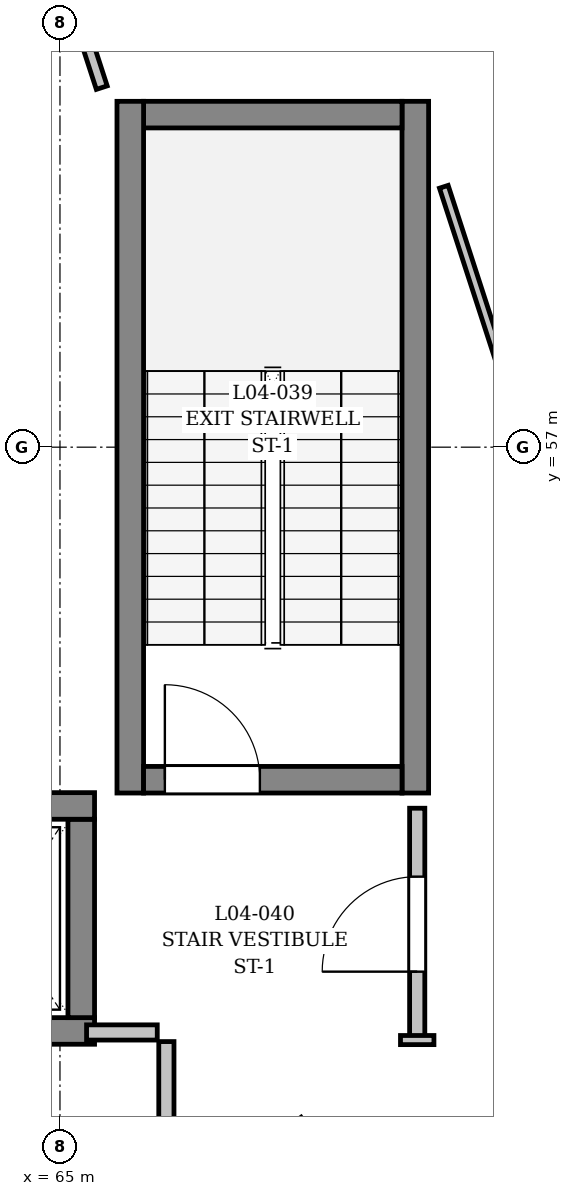
"""IFC4 building model, lengths in metres.
Left out: names, types, materials, properties, quantities, classifications, styles, units other than length and angle.
Written with IfcOpenShell. Run it as: python <this file> out.ifc"""

import sys

from ifc_helpers import new_model, si_unit, direction, frame, frame_2d, origin, place, context, subcontext, project, spatial, rectangle, extrude, element, fill, save


model = new_model("IFC4")
c1 = context("Model", 3, precision=1e-05, world=origin(), true_north=direction((0.0, 1.0)))
c2 = subcontext(c1, "Body", "Model", "MODEL_VIEW")
j1 = project(units=[si_unit("LENGTHUNIT", "METRE"), si_unit("PLANEANGLEUNIT", "RADIAN")], contexts=[c1])
p1 = place(None, origin())
s1 = spatial("IfcSite", under=j1, at=p1, CompositionType="ELEMENT")
p2 = place(p1, origin())
s2 = spatial("IfcBuilding", under=s1, at=p2, CompositionType="ELEMENT")
p3 = place(p2, frame((0.0, 0.0, 15.0)))
s3 = spatial("IfcBuildingStorey", under=s2, at=p3, CompositionType="ELEMENT", Elevation=15.0)
p4 = place(p3, frame((69.675, 52.45, 0.0), z_axis=(0.0, 0.0, 1.0), x_axis=(0.0, 1.0, 0.0)))
e1 = element("IfcWall", 1, at=p4, inside=s3, PredefinedType="SHEAR", context=c2, shape_type="SweptSolid", body=[
    extrude(rectangle(XDim=9.1, YDim=0.35, at=frame_2d((4.55, 0.0))), origin(), (0.0, 0.0, 1.0), 4.45),
])
p5 = place(p3, frame((69.5, 61.375, 0.0), z_axis=(0.0, 0.0, 1.0), x_axis=(-1.0, 0.0, 0.0)))
e2 = element("IfcWall", 2, at=p5, inside=s3, PredefinedType="SHEAR", context=c2, shape_type="SweptSolid", body=[
    extrude(rectangle(XDim=3.4, YDim=0.35, at=frame_2d((1.7, 0.0))), origin(), (0.0, 0.0, 1.0), 4.45),
])
p6 = place(p3, frame((65.925, 61.55, 0.0), z_axis=(0.0, 0.0, 1.0), x_axis=(0.0, -1.0, 0.0)))
e3 = element("IfcWall", 3, at=p6, inside=s3, PredefinedType="SHEAR", context=c2, shape_type="SweptSolid", body=[
    extrude(rectangle(XDim=9.1, YDim=0.35, at=frame_2d((4.55, 0.0))), origin(), (0.0, 0.0, 1.0), 4.45),
])
p7 = place(p3, frame((66.1, 52.625, 0.0), z_axis=(0.0, 0.0, 1.0), x_axis=(1.0, 0.0, 0.0)))
e4 = element("IfcWall", 4, at=p7, inside=s3, PredefinedType="SHEAR", context=c2, shape_type="SweptSolid", body=[
    extrude(rectangle(XDim=3.4, YDim=0.35, at=frame_2d((1.7, 0.0))), origin(), (0.0, 0.0, 1.0), 4.45),
])
p8 = place(p7, frame((0.28, 0.0, 0.0)))
e5 = element("IfcOpeningElement", 5, at=p8, cuts=e4, PredefinedType="OPENING", context=c2, shape_type="SweptSolid", body=[
    extrude(rectangle(XDim=1.25, YDim=2.2, at=frame_2d((0.625, 1.1))), frame((0.0, 0.185, 0.0), z_axis=(0.0, -1.0, 0.0), x_axis=(1.0, 0.0, 0.0)), (0.0, 0.0, 1.0), 0.37),
])
p9 = place(p3, frame((62.945, 49.32, 0.0), z_axis=(0.0, 0.0, 1.0), x_axis=(1.0, 0.0, 0.0)))
e6 = element("IfcWall", 6, at=p9, inside=s3, PredefinedType="SHEAR", context=c2, shape_type="SweptSolid", body=[
    extrude(rectangle(XDim=2.51, YDim=0.35, at=frame_2d((1.255, 0.0))), origin(), (0.0, 0.0, 1.0), 4.45),
])
p10 = place(p9, frame((0.705, 0.0, 0.0)))
e7 = element("IfcOpeningElement", 7, at=p10, cuts=e6, PredefinedType="OPENING", context=c2, shape_type="SweptSolid", body=[
    extrude(rectangle(XDim=1.1, YDim=2.2, at=frame_2d((0.55, 1.1))), frame((0.0, 0.185, 0.0), z_axis=(0.0, -1.0, 0.0), x_axis=(1.0, 0.0, 0.0)), (0.0, 0.0, 1.0), 0.37),
])
p11 = place(p3, frame((65.28, 49.495, 0.0), z_axis=(0.0, 0.0, 1.0), x_axis=(0.0, 1.0, 0.0)))
e8 = element("IfcWall", 8, at=p11, inside=s3, PredefinedType="SHEAR", context=c2, shape_type="SweptSolid", body=[
    extrude(rectangle(XDim=2.61, YDim=0.35, at=frame_2d((1.305, 0.0))), origin(), (0.0, 0.0, 1.0), 4.45),
])
p12 = place(p3, frame((65.455, 52.28, 0.0), z_axis=(0.0, 0.0, 1.0), x_axis=(-1.0, 0.0, 0.0)))
e9 = element("IfcWall", 9, at=p12, inside=s3, PredefinedType="SHEAR", context=c2, shape_type="SweptSolid", body=[
    extrude(rectangle(XDim=2.51, YDim=0.35, at=frame_2d((1.255, 0.0))), origin(), (0.0, 0.0, 1.0), 4.45),
])
p13 = place(p3, frame((66.4, 46.32, 0.0), z_axis=(0.0, 0.0, 1.0), x_axis=(0.0, 1.0, 0.0)))
e10 = element("IfcWall", 10, at=p13, inside=s3, PredefinedType="PARTITIONING", context=c2, shape_type="SweptSolid", body=[
    extrude(rectangle(XDim=2.86, YDim=0.2, at=frame_2d((1.43, 0.0))), origin(), (0.0, 0.0, 1.0), 4.45),
])
p14 = place(p3, frame((65.35, 49.3, 0.0), z_axis=(0.0, 0.0, 1.0), x_axis=(1.0, 0.0, 0.0)))
e11 = element("IfcWall", 11, at=p14, inside=s3, PredefinedType="PARTITIONING", context=c2, shape_type="SweptSolid", body=[
    extrude(rectangle(XDim=0.93, YDim=0.2, at=frame_2d((0.465, 0.0))), origin(), (0.0, 0.0, 1.0), 4.45),
])
p15 = place(p3, frame((69.7, 49.2, 0.0), z_axis=(0.0, 0.0, 1.0), x_axis=(0.0, 1.0, 0.0)))
e12 = element("IfcWall", 12, at=p15, inside=s3, PredefinedType="PARTITIONING", context=c2, shape_type="SweptSolid", body=[
    extrude(rectangle(XDim=3.05, YDim=0.2, at=frame_2d((1.525, 0.0))), origin(), (0.0, 0.0, 1.0), 4.45),
])
p16 = place(p15, frame((0.9, 0.0, 0.0)))
e13 = element("IfcOpeningElement", 13, at=p16, cuts=e12, PredefinedType="OPENING", context=c2, shape_type="SweptSolid", body=[
    extrude(rectangle(XDim=1.25, YDim=2.2, at=frame_2d((0.625, 1.1))), frame((0.0, 0.11, 0.0), z_axis=(0.0, -1.0, 0.0), x_axis=(1.0, 0.0, 0.0)), (0.0, 0.0, 1.0), 0.22),
])
p17 = place(p3, frame((70.05, 60.426, 0.0), z_axis=(0.0, 0.0, 1.0), x_axis=(0.309000246947, -0.951061957701, 0.0)))
e14 = element("IfcWall", 14, at=p17, inside=s3, PredefinedType="PARTITIONING", context=c2, shape_type="SweptSolid", body=[
    extrude(rectangle(XDim=3.602, YDim=0.12, at=frame_2d((1.801, 0.0))), origin(), (0.0, 0.0, 1.0), 4.45),
])
p18 = place(p3, frame((65.55, 61.73, 0.0), z_axis=(0.0, 0.0, 1.0), x_axis=(-0.309032395142, 0.951051512145, 0.0)))
e15 = element("IfcWall", 15, at=p18, inside=s3, PredefinedType="PARTITIONING", context=c2, shape_type="SweptSolid", body=[
    extrude(rectangle(XDim=1.131, YDim=0.15, at=frame_2d((0.566, 0.0))), origin(), (0.0, 0.0, 1.0), 4.45),
])
p19 = place(p3, frame((69.92, 49.2, 0.0), z_axis=(0.0, 0.0, 1.0), x_axis=(-1.0, 0.0, 0.0)))
e16 = element("IfcWall", 16, at=p19, inside=s3, PredefinedType="PARTITIONING", context=c2, shape_type="SweptSolid", body=[
    extrude(rectangle(XDim=0.44, YDim=0.12, at=frame_2d((0.22, 0.0))), origin(), (0.0, 0.0, 1.0), 4.45),
])
p20 = place(p8, origin())
e17 = element("IfcDoor", 17, at=p20, inside=s3, OperationType="SINGLE_SWING_LEFT", PredefinedType="DOOR", context=c2, shape_type="SweptSolid", body=[
    extrude(rectangle(XDim=1.25, YDim=2.2, at=frame_2d((0.625, 1.1))), frame((0.0, 0.025, 0.0), z_axis=(0.0, -1.0, 0.0), x_axis=(1.0, 0.0, 0.0)), (0.0, 0.0, 1.0), 0.05),
])
fill(e5, e17)
p21 = place(p16, origin())
e18 = element("IfcDoor", 18, at=p21, inside=s3, OperationType="SINGLE_SWING_LEFT", PredefinedType="DOOR", context=c2, shape_type="SweptSolid", body=[
    extrude(rectangle(XDim=1.25, YDim=2.2, at=frame_2d((0.625, 1.1))), frame((0.0, 0.025, 0.0), z_axis=(0.0, -1.0, 0.0), x_axis=(1.0, 0.0, 0.0)), (0.0, 0.0, 1.0), 0.05),
])
fill(e13, e18)
save(model, sys.argv[1])
